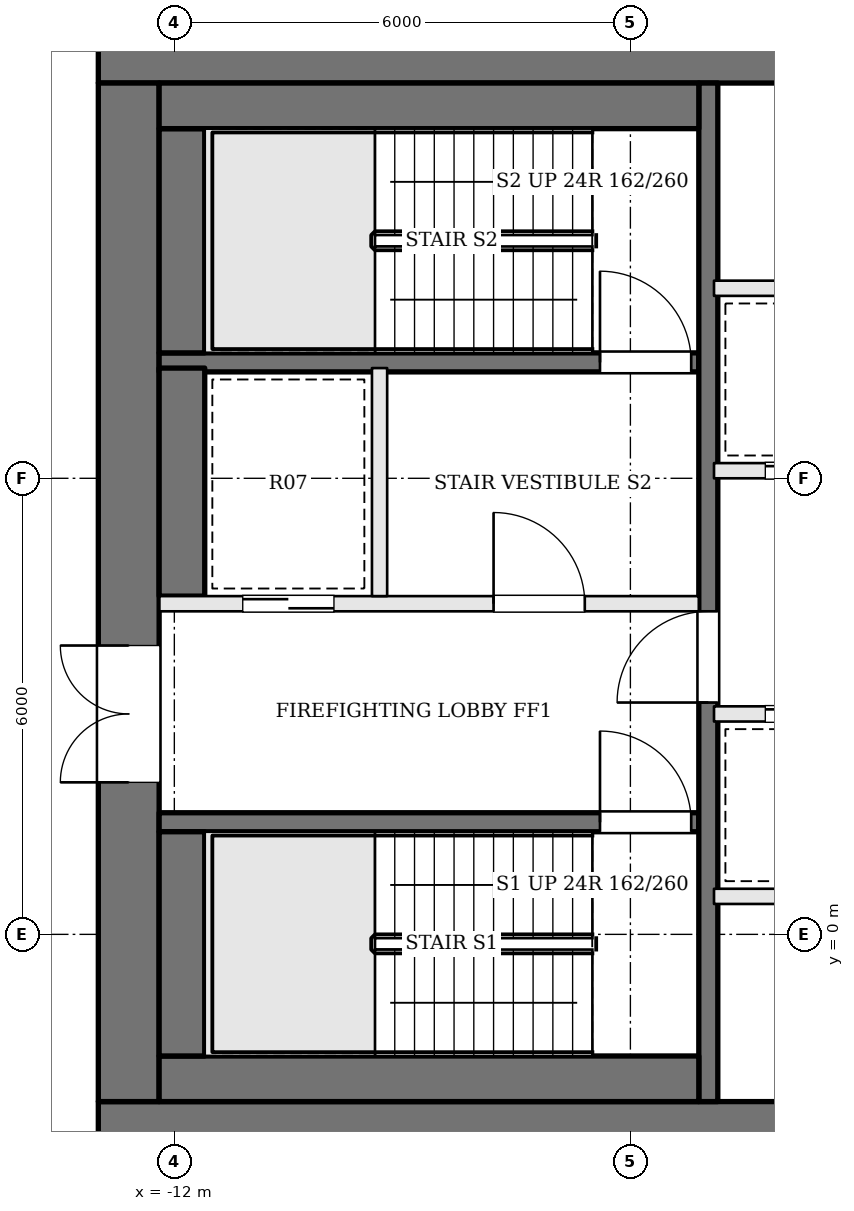
"""IFC4 building model, lengths in metres.
Left out: names, types, materials, properties, quantities, classifications, styles, units other than length and angle.
Written with IfcOpenShell. Run it as: python <this file> out.ifc"""

import sys

from ifc_helpers import new_model, si_unit, direction, frame, frame_2d, origin, place, context, subcontext, project, spatial, rectangle, extrude, element, fill, save


model = new_model("IFC4")
c1 = context("Model", 3, precision=1e-05, world=origin(), true_north=direction((0.0, 1.0)))
c2 = subcontext(c1, "Body", "Model", "MODEL_VIEW")
j1 = project(units=[si_unit("LENGTHUNIT", "METRE"), si_unit("PLANEANGLEUNIT", "RADIAN")], contexts=[c1])
p1 = place(None, origin())
s1 = spatial("IfcSite", under=j1, at=p1, CompositionType="ELEMENT")
p2 = place(p1, origin())
s2 = spatial("IfcBuilding", under=s1, at=p2, CompositionType="ELEMENT")
p3 = place(p2, frame((0.0, 0.0, 284.4)))
s3 = spatial("IfcBuildingStorey", under=s2, at=p3, CompositionType="ELEMENT", Elevation=284.4)
p4 = place(p3, frame((-13.0, 11.6, 0.0), z_axis=(0.0, 0.0, 1.0), x_axis=(1.0, 0.0, 0.0)))
e1 = element("IfcWall", 1, at=p4, inside=s3, PredefinedType="SHEAR", context=c2, shape_type="SweptSolid", body=[
    extrude(rectangle(XDim=26.0, YDim=0.8, at=frame_2d((13.0, 0.0))), origin(), (0.0, 0.0, 1.0), 3.9),
])
p5 = place(p4, frame((9.65, 0.0, 0.0)))
e2 = element("IfcOpeningElement", 2, at=p5, cuts=e1, PredefinedType="OPENING", context=c2, shape_type="SweptSolid", body=[
    extrude(rectangle(XDim=1.0, YDim=2.1, at=frame_2d((0.5, 1.05))), frame((0.0, 0.41, 0.0), z_axis=(0.0, -1.0, 0.0), x_axis=(1.0, 0.0, 0.0)), (0.0, 0.0, 1.0), 0.82),
])
p6 = place(p4, frame((12.675, 0.0, 0.0)))
e3 = element("IfcOpeningElement", 3, at=p6, cuts=e1, PredefinedType="OPENING", context=c2, shape_type="SweptSolid", body=[
    extrude(rectangle(XDim=0.7, YDim=2.1, at=frame_2d((0.35, 1.05))), frame((0.0, 0.41, 0.0), z_axis=(0.0, -1.0, 0.0), x_axis=(1.0, 0.0, 0.0)), (0.0, 0.0, 1.0), 0.82),
])
p7 = place(p4, frame((14.725, 0.0, 0.0)))
e4 = element("IfcOpeningElement", 4, at=p7, cuts=e1, PredefinedType="OPENING", context=c2, shape_type="SweptSolid", body=[
    extrude(rectangle(XDim=0.7, YDim=2.1, at=frame_2d((0.35, 1.05))), frame((0.0, 0.41, 0.0), z_axis=(0.0, -1.0, 0.0), x_axis=(1.0, 0.0, 0.0)), (0.0, 0.0, 1.0), 0.82),
])
p8 = place(p4, frame((16.6, 0.0, 0.0)))
e5 = element("IfcOpeningElement", 5, at=p8, cuts=e1, PredefinedType="OPENING", context=c2, shape_type="SweptSolid", body=[
    extrude(rectangle(XDim=1.0, YDim=2.1, at=frame_2d((0.5, 1.05))), frame((0.0, 0.41, 0.0), z_axis=(0.0, -1.0, 0.0), x_axis=(1.0, 0.0, 0.0)), (0.0, 0.0, 1.0), 0.82),
])
p9 = place(p3, frame((-13.0, -2.6, 0.0), z_axis=(0.0, 0.0, 1.0), x_axis=(1.0, 0.0, 0.0)))
e6 = element("IfcWall", 6, at=p9, inside=s3, PredefinedType="SHEAR", context=c2, shape_type="SweptSolid", body=[
    extrude(rectangle(XDim=26.0, YDim=0.8, at=frame_2d((13.0, 0.0))), origin(), (0.0, 0.0, 1.0), 3.9),
])
p10 = place(p9, frame((9.275, 0.0, 0.0)))
e7 = element("IfcOpeningElement", 7, at=p10, cuts=e6, PredefinedType="OPENING", context=c2, shape_type="SweptSolid", body=[
    extrude(rectangle(XDim=0.9, YDim=2.1, at=frame_2d((0.45, 1.05))), frame((0.0, 0.41, 0.0), z_axis=(0.0, -1.0, 0.0), x_axis=(1.0, 0.0, 0.0)), (0.0, 0.0, 1.0), 0.82),
])
p11 = place(p9, frame((11.75, 0.0, 0.0)))
e8 = element("IfcOpeningElement", 8, at=p11, cuts=e6, PredefinedType="OPENING", context=c2, shape_type="SweptSolid", body=[
    extrude(rectangle(XDim=1.0, YDim=2.1, at=frame_2d((0.5, 1.05))), frame((0.0, 0.41, 0.0), z_axis=(0.0, -1.0, 0.0), x_axis=(1.0, 0.0, 0.0)), (0.0, 0.0, 1.0), 0.82),
])
p12 = place(p9, frame((14.325, 0.0, 0.0)))
e9 = element("IfcOpeningElement", 9, at=p12, cuts=e6, PredefinedType="OPENING", context=c2, shape_type="SweptSolid", body=[
    extrude(rectangle(XDim=0.9, YDim=2.1, at=frame_2d((0.45, 1.05))), frame((0.0, 0.41, 0.0), z_axis=(0.0, -1.0, 0.0), x_axis=(1.0, 0.0, 0.0)), (0.0, 0.0, 1.0), 0.82),
])
p13 = place(p9, frame((16.7, 0.0, 0.0)))
e10 = element("IfcOpeningElement", 10, at=p13, cuts=e6, PredefinedType="OPENING", context=c2, shape_type="SweptSolid", body=[
    extrude(rectangle(XDim=0.9, YDim=2.1, at=frame_2d((0.45, 1.05))), frame((0.0, 0.41, 0.0), z_axis=(0.0, -1.0, 0.0), x_axis=(1.0, 0.0, 0.0)), (0.0, 0.0, 1.0), 0.82),
])
p14 = place(p3, frame((-12.6, -2.2, 0.0), z_axis=(0.0, 0.0, 1.0), x_axis=(0.0, 1.0, 0.0)))
e11 = element("IfcWall", 11, at=p14, inside=s3, PredefinedType="SHEAR", context=c2, shape_type="SweptSolid", body=[
    extrude(rectangle(XDim=13.4, YDim=0.8, at=frame_2d((6.7, 0.0))), origin(), (0.0, 0.0, 1.0), 3.9),
])
p15 = place(p14, frame((4.2, 0.0, 0.0)))
e12 = element("IfcOpeningElement", 12, at=p15, cuts=e11, PredefinedType="OPENING", context=c2, shape_type="SweptSolid", body=[
    extrude(rectangle(XDim=1.8, YDim=2.1, at=frame_2d((0.9, 1.05))), frame((0.0, 0.41, 0.0), z_axis=(0.0, -1.0, 0.0), x_axis=(1.0, 0.0, 0.0)), (0.0, 0.0, 1.0), 0.82),
])
p16 = place(p3, frame((-12.2, 1.475, 0.0), z_axis=(0.0, 0.0, 1.0), x_axis=(1.0, 0.0, 0.0)))
e13 = element("IfcWall", 13, at=p16, inside=s3, PredefinedType="SOLIDWALL", context=c2, shape_type="SweptSolid", body=[
    extrude(rectangle(XDim=7.1, YDim=0.25, at=frame_2d((3.55, 0.0))), origin(), (0.0, 0.0, 1.0), 3.7),
])
p17 = place(p16, frame((5.8, 0.0, 0.0)))
e14 = element("IfcOpeningElement", 14, at=p17, cuts=e13, PredefinedType="OPENING", context=c2, shape_type="SweptSolid", body=[
    extrude(rectangle(XDim=1.2, YDim=2.1, at=frame_2d((0.6, 1.05))), frame((0.0, 0.135, 0.0), z_axis=(0.0, -1.0, 0.0), x_axis=(1.0, 0.0, 0.0)), (0.0, 0.0, 1.0), 0.27),
])
p18 = place(p3, frame((-12.2, 4.35, 0.0), z_axis=(0.0, 0.0, 1.0), x_axis=(1.0, 0.0, 0.0)))
e15 = element("IfcWall", 15, at=p18, inside=s3, PredefinedType="SOLIDWALL", context=c2, shape_type="SweptSolid", body=[
    extrude(rectangle(XDim=7.1, YDim=0.2, at=frame_2d((3.55, 0.0))), origin(), (0.0, 0.0, 1.0), 3.7),
])
p19 = place(p18, frame((4.4, 0.0, 0.0)))
e16 = element("IfcOpeningElement", 16, at=p19, cuts=e15, PredefinedType="OPENING", context=c2, shape_type="SweptSolid", body=[
    extrude(rectangle(XDim=1.2, YDim=2.1, at=frame_2d((0.6, 1.05))), frame((0.0, 0.11, 0.0), z_axis=(0.0, -1.0, 0.0), x_axis=(1.0, 0.0, 0.0)), (0.0, 0.0, 1.0), 0.22),
])
p20 = place(p18, frame((1.1, 0.0, 0.0)))
e17 = element("IfcOpeningElement", 17, at=p20, cuts=e15, PredefinedType="OPENING", context=c2, shape_type="SweptSolid", body=[
    extrude(rectangle(XDim=1.2, YDim=2.1, at=frame_2d((0.6, 1.05))), frame((0.0, 0.11, 0.0), z_axis=(0.0, -1.0, 0.0), x_axis=(1.0, 0.0, 0.0)), (0.0, 0.0, 1.0), 0.22),
])
p21 = place(p3, frame((-12.2, 7.525, 0.0), z_axis=(0.0, 0.0, 1.0), x_axis=(1.0, 0.0, 0.0)))
e18 = element("IfcWall", 18, at=p21, inside=s3, PredefinedType="SOLIDWALL", context=c2, shape_type="SweptSolid", body=[
    extrude(rectangle(XDim=7.1, YDim=0.25, at=frame_2d((3.55, 0.0))), origin(), (0.0, 0.0, 1.0), 3.7),
])
p22 = place(p21, frame((5.8, 0.0, 0.0)))
e19 = element("IfcOpeningElement", 19, at=p22, cuts=e18, PredefinedType="OPENING", context=c2, shape_type="SweptSolid", body=[
    extrude(rectangle(XDim=1.2, YDim=2.1, at=frame_2d((0.6, 1.05))), frame((0.0, 0.135, 0.0), z_axis=(0.0, -1.0, 0.0), x_axis=(1.0, 0.0, 0.0)), (0.0, 0.0, 1.0), 0.27),
])
p23 = place(p3, frame((-9.3, 4.45, 0.0), z_axis=(0.0, 0.0, 1.0), x_axis=(0.0, 1.0, 0.0)))
e20 = element("IfcWall", 20, at=p23, inside=s3, PredefinedType="SOLIDWALL", context=c2, shape_type="SweptSolid", body=[
    extrude(rectangle(XDim=3.0, YDim=0.2, at=frame_2d((1.5, 0.0))), origin(), (0.0, 0.0, 1.0), 3.7),
])
p24 = place(p3, frame((-4.975, -2.2, 0.0), z_axis=(0.0, 0.0, 1.0), x_axis=(0.0, 1.0, 0.0)))
e21 = element("IfcWall", 21, at=p24, inside=s3, PredefinedType="SOLIDWALL", context=c2, shape_type="SweptSolid", body=[
    extrude(rectangle(XDim=13.4, YDim=0.25, at=frame_2d((6.7, 0.0))), origin(), (0.0, 0.0, 1.0), 3.7),
])
p25 = place(p24, frame((5.25, 0.0, 0.0)))
e22 = element("IfcOpeningElement", 22, at=p25, cuts=e21, PredefinedType="OPENING", context=c2, shape_type="SweptSolid", body=[
    extrude(rectangle(XDim=1.2, YDim=2.1, at=frame_2d((0.6, 1.05))), frame((0.0, 0.135, 0.0), z_axis=(0.0, -1.0, 0.0), x_axis=(1.0, 0.0, 0.0)), (0.0, 0.0, 1.0), 0.27),
])
p26 = place(p3, frame((-12.2, -1.9, 0.0), z_axis=(0.0, 0.0, 1.0), x_axis=(1.0, 0.0, 0.0)))
e23 = element("IfcWall", 23, at=p26, inside=s3, PredefinedType="SOLIDWALL", context=c2, shape_type="SweptSolid", body=[
    extrude(rectangle(XDim=7.1, YDim=0.6, at=frame_2d((3.55, 0.0))), origin(), (0.0, 0.0, 1.0), 3.7),
])
p27 = place(p3, frame((-11.9, -1.6, 0.0), z_axis=(0.0, 0.0, 1.0), x_axis=(0.0, 1.0, 0.0)))
e24 = element("IfcWall", 24, at=p27, inside=s3, PredefinedType="SOLIDWALL", context=c2, shape_type="SweptSolid", body=[
    extrude(rectangle(XDim=2.95, YDim=0.6, at=frame_2d((1.475, 0.0))), origin(), (0.0, 0.0, 1.0), 3.7),
])
p28 = place(p3, frame((-11.9, 4.45, 0.0), z_axis=(0.0, 0.0, 1.0), x_axis=(0.0, 1.0, 0.0)))
e25 = element("IfcWall", 25, at=p28, inside=s3, PredefinedType="SOLIDWALL", context=c2, shape_type="SweptSolid", body=[
    extrude(rectangle(XDim=3.0, YDim=0.6, at=frame_2d((1.5, 0.0))), origin(), (0.0, 0.0, 1.0), 3.7),
])
p29 = place(p3, frame((-11.9, 7.65, 0.0), z_axis=(0.0, 0.0, 1.0), x_axis=(0.0, 1.0, 0.0)))
e26 = element("IfcWall", 26, at=p29, inside=s3, PredefinedType="SOLIDWALL", context=c2, shape_type="SweptSolid", body=[
    extrude(rectangle(XDim=2.95, YDim=0.6, at=frame_2d((1.475, 0.0))), origin(), (0.0, 0.0, 1.0), 3.7),
])
p30 = place(p3, frame((-12.2, 10.9, 0.0), z_axis=(0.0, 0.0, 1.0), x_axis=(1.0, 0.0, 0.0)))
e27 = element("IfcWall", 27, at=p30, inside=s3, PredefinedType="SOLIDWALL", context=c2, shape_type="SweptSolid", body=[
    extrude(rectangle(XDim=7.1, YDim=0.6, at=frame_2d((3.55, 0.0))), origin(), (0.0, 0.0, 1.0), 3.7),
])
p31 = place(p3, frame((-4.9, 0.5, 0.0), z_axis=(0.0, 0.0, 1.0), x_axis=(1.0, 0.0, 0.0)))
e28 = element("IfcWall", 28, at=p31, inside=s3, PredefinedType="SOLIDWALL", context=c2, shape_type="SweptSolid", body=[
    extrude(rectangle(XDim=9.8, YDim=0.2, at=frame_2d((4.9, 0.0))), origin(), (0.0, 0.0, 1.0), 3.7),
])
p32 = place(p3, frame((-4.9, 2.9, 0.0), z_axis=(0.0, 0.0, 1.0), x_axis=(1.0, 0.0, 0.0)))
e29 = element("IfcWall", 29, at=p32, inside=s3, PredefinedType="SOLIDWALL", context=c2, shape_type="SweptSolid", body=[
    extrude(rectangle(XDim=9.8, YDim=0.2, at=frame_2d((4.9, 0.0))), origin(), (0.0, 0.0, 1.0), 3.7),
])
p33 = place(p32, frame((0.675, 0.0, 0.0)))
e30 = element("IfcOpeningElement", 30, at=p33, cuts=e29, PredefinedType="OPENING", context=c2, shape_type="SweptSolid", body=[
    extrude(rectangle(XDim=1.1, YDim=2.1, at=frame_2d((0.55, 1.05))), frame((0.0, 0.11, 0.0), z_axis=(0.0, -1.0, 0.0), x_axis=(1.0, 0.0, 0.0)), (0.0, 0.0, 1.0), 0.22),
])
p34 = place(p32, frame((2.613, 0.0, 0.0)))
e31 = element("IfcOpeningElement", 31, at=p34, cuts=e29, PredefinedType="OPENING", context=c2, shape_type="SweptSolid", body=[
    extrude(rectangle(XDim=0.9, YDim=2.1, at=frame_2d((0.45, 1.05))), frame((0.0, 0.11, 0.0), z_axis=(0.0, -1.0, 0.0), x_axis=(1.0, 0.0, 0.0)), (0.0, 0.0, 1.0), 0.22),
])
p35 = place(p32, frame((4.35, 0.0, 0.0)))
e32 = element("IfcOpeningElement", 32, at=p35, cuts=e29, PredefinedType="OPENING", context=c2, shape_type="SweptSolid", body=[
    extrude(rectangle(XDim=1.1, YDim=2.1, at=frame_2d((0.55, 1.05))), frame((0.0, 0.11, 0.0), z_axis=(0.0, -1.0, 0.0), x_axis=(1.0, 0.0, 0.0)), (0.0, 0.0, 1.0), 0.22),
])
p36 = place(p32, frame((7.463, 0.0, 0.0)))
e33 = element("IfcOpeningElement", 33, at=p36, cuts=e29, PredefinedType="OPENING", context=c2, shape_type="SweptSolid", body=[
    extrude(rectangle(XDim=1.0, YDim=2.1, at=frame_2d((0.5, 1.05))), frame((0.0, 0.11, 0.0), z_axis=(0.0, -1.0, 0.0), x_axis=(1.0, 0.0, 0.0)), (0.0, 0.0, 1.0), 0.22),
])
p37 = place(p3, frame((-4.9, 6.1, 0.0), z_axis=(0.0, 0.0, 1.0), x_axis=(1.0, 0.0, 0.0)))
e34 = element("IfcWall", 34, at=p37, inside=s3, PredefinedType="SOLIDWALL", context=c2, shape_type="SweptSolid", body=[
    extrude(rectangle(XDim=9.8, YDim=0.2, at=frame_2d((4.9, 0.0))), origin(), (0.0, 0.0, 1.0), 3.7),
])
p38 = place(p37, frame((0.675, 0.0, 0.0)))
e35 = element("IfcOpeningElement", 35, at=p38, cuts=e34, PredefinedType="OPENING", context=c2, shape_type="SweptSolid", body=[
    extrude(rectangle(XDim=1.1, YDim=2.1, at=frame_2d((0.55, 1.05))), frame((0.0, 0.11, 0.0), z_axis=(0.0, -1.0, 0.0), x_axis=(1.0, 0.0, 0.0)), (0.0, 0.0, 1.0), 0.22),
])
p39 = place(p37, frame((3.125, 0.0, 0.0)))
e36 = element("IfcOpeningElement", 36, at=p39, cuts=e34, PredefinedType="OPENING", context=c2, shape_type="SweptSolid", body=[
    extrude(rectangle(XDim=1.1, YDim=2.1, at=frame_2d((0.55, 1.05))), frame((0.0, 0.11, 0.0), z_axis=(0.0, -1.0, 0.0), x_axis=(1.0, 0.0, 0.0)), (0.0, 0.0, 1.0), 0.22),
])
p40 = place(p37, frame((5.575, 0.0, 0.0)))
e37 = element("IfcOpeningElement", 37, at=p40, cuts=e34, PredefinedType="OPENING", context=c2, shape_type="SweptSolid", body=[
    extrude(rectangle(XDim=1.1, YDim=2.1, at=frame_2d((0.55, 1.05))), frame((0.0, 0.11, 0.0), z_axis=(0.0, -1.0, 0.0), x_axis=(1.0, 0.0, 0.0)), (0.0, 0.0, 1.0), 0.22),
])
p41 = place(p37, frame((8.025, 0.0, 0.0)))
e38 = element("IfcOpeningElement", 38, at=p41, cuts=e34, PredefinedType="OPENING", context=c2, shape_type="SweptSolid", body=[
    extrude(rectangle(XDim=1.1, YDim=2.1, at=frame_2d((0.55, 1.05))), frame((0.0, 0.11, 0.0), z_axis=(0.0, -1.0, 0.0), x_axis=(1.0, 0.0, 0.0)), (0.0, 0.0, 1.0), 0.22),
])
p42 = place(p3, frame((-4.9, 8.5, 0.0), z_axis=(0.0, 0.0, 1.0), x_axis=(1.0, 0.0, 0.0)))
e39 = element("IfcWall", 39, at=p42, inside=s3, PredefinedType="SOLIDWALL", context=c2, shape_type="SweptSolid", body=[
    extrude(rectangle(XDim=9.8, YDim=0.2, at=frame_2d((4.9, 0.0))), origin(), (0.0, 0.0, 1.0), 3.7),
])
p43 = place(p15, origin())
e40 = element("IfcDoor", 40, at=p43, inside=s3, OperationType="DOUBLE_DOOR_SINGLE_SWING", PredefinedType="DOOR", context=c2, shape_type="SweptSolid", body=[
    extrude(rectangle(XDim=1.8, YDim=2.1, at=frame_2d((0.9, 1.05))), frame((0.0, 0.025, 0.0), z_axis=(0.0, -1.0, 0.0), x_axis=(1.0, 0.0, 0.0)), (0.0, 0.0, 1.0), 0.05),
])
fill(e12, e40)
p44 = place(p25, origin())
e41 = element("IfcDoor", 41, at=p44, inside=s3, OperationType="SINGLE_SWING_LEFT", PredefinedType="DOOR", context=c2, shape_type="SweptSolid", body=[
    extrude(rectangle(XDim=1.2, YDim=2.1, at=frame_2d((0.6, 1.05))), frame((0.0, 0.025, 0.0), z_axis=(0.0, -1.0, 0.0), x_axis=(1.0, 0.0, 0.0)), (0.0, 0.0, 1.0), 0.05),
])
fill(e22, e41)
p45 = place(p19, origin())
e42 = element("IfcDoor", 42, at=p45, inside=s3, OperationType="SINGLE_SWING_LEFT", PredefinedType="DOOR", context=c2, shape_type="SweptSolid", body=[
    extrude(rectangle(XDim=1.2, YDim=2.1, at=frame_2d((0.6, 1.05))), frame((0.0, 0.025, 0.0), z_axis=(0.0, -1.0, 0.0), x_axis=(1.0, 0.0, 0.0)), (0.0, 0.0, 1.0), 0.05),
])
fill(e16, e42)
p46 = place(p17, origin())
e43 = element("IfcDoor", 43, at=p46, inside=s3, OperationType="SINGLE_SWING_LEFT", PredefinedType="DOOR", context=c2, shape_type="SweptSolid", body=[
    extrude(rectangle(XDim=1.2, YDim=2.1, at=frame_2d((0.6, 1.05))), frame((0.0, 0.025, 0.0), z_axis=(0.0, -1.0, 0.0), x_axis=(1.0, 0.0, 0.0)), (0.0, 0.0, 1.0), 0.05),
])
fill(e14, e43)
p47 = place(p22, origin())
e44 = element("IfcDoor", 44, at=p47, inside=s3, OperationType="SINGLE_SWING_LEFT", PredefinedType="DOOR", context=c2, shape_type="SweptSolid", body=[
    extrude(rectangle(XDim=1.2, YDim=2.1, at=frame_2d((0.6, 1.05))), frame((0.0, 0.025, 0.0), z_axis=(0.0, -1.0, 0.0), x_axis=(1.0, 0.0, 0.0)), (0.0, 0.0, 1.0), 0.05),
])
fill(e19, e44)
p48 = place(p20, origin())
e45 = element("IfcDoor", 45, at=p48, inside=s3, OperationType="SLIDING_TO_RIGHT", PredefinedType="DOOR", context=c2, shape_type="SweptSolid", body=[
    extrude(rectangle(XDim=1.2, YDim=2.1, at=frame_2d((0.6, 1.05))), frame((0.0, 0.025, 0.0), z_axis=(0.0, -1.0, 0.0), x_axis=(1.0, 0.0, 0.0)), (0.0, 0.0, 1.0), 0.05),
])
fill(e17, e45)
p49 = place(p33, origin())
e46 = element("IfcDoor", 46, at=p49, inside=s3, OperationType="SLIDING_TO_RIGHT", PredefinedType="DOOR", context=c2, shape_type="SweptSolid", body=[
    extrude(rectangle(XDim=1.1, YDim=2.1, at=frame_2d((0.55, 1.05))), frame((0.0, 0.025, 0.0), z_axis=(0.0, -1.0, 0.0), x_axis=(1.0, 0.0, 0.0)), (0.0, 0.0, 1.0), 0.05),
])
fill(e30, e46)
p50 = place(p38, origin())
e47 = element("IfcDoor", 47, at=p50, inside=s3, OperationType="SLIDING_TO_RIGHT", PredefinedType="DOOR", context=c2, shape_type="SweptSolid", body=[
    extrude(rectangle(XDim=1.1, YDim=2.1, at=frame_2d((0.55, 1.05))), frame((0.0, 0.025, 0.0), z_axis=(0.0, -1.0, 0.0), x_axis=(1.0, 0.0, 0.0)), (0.0, 0.0, 1.0), 0.05),
])
fill(e35, e47)
save(model, sys.argv[1])
